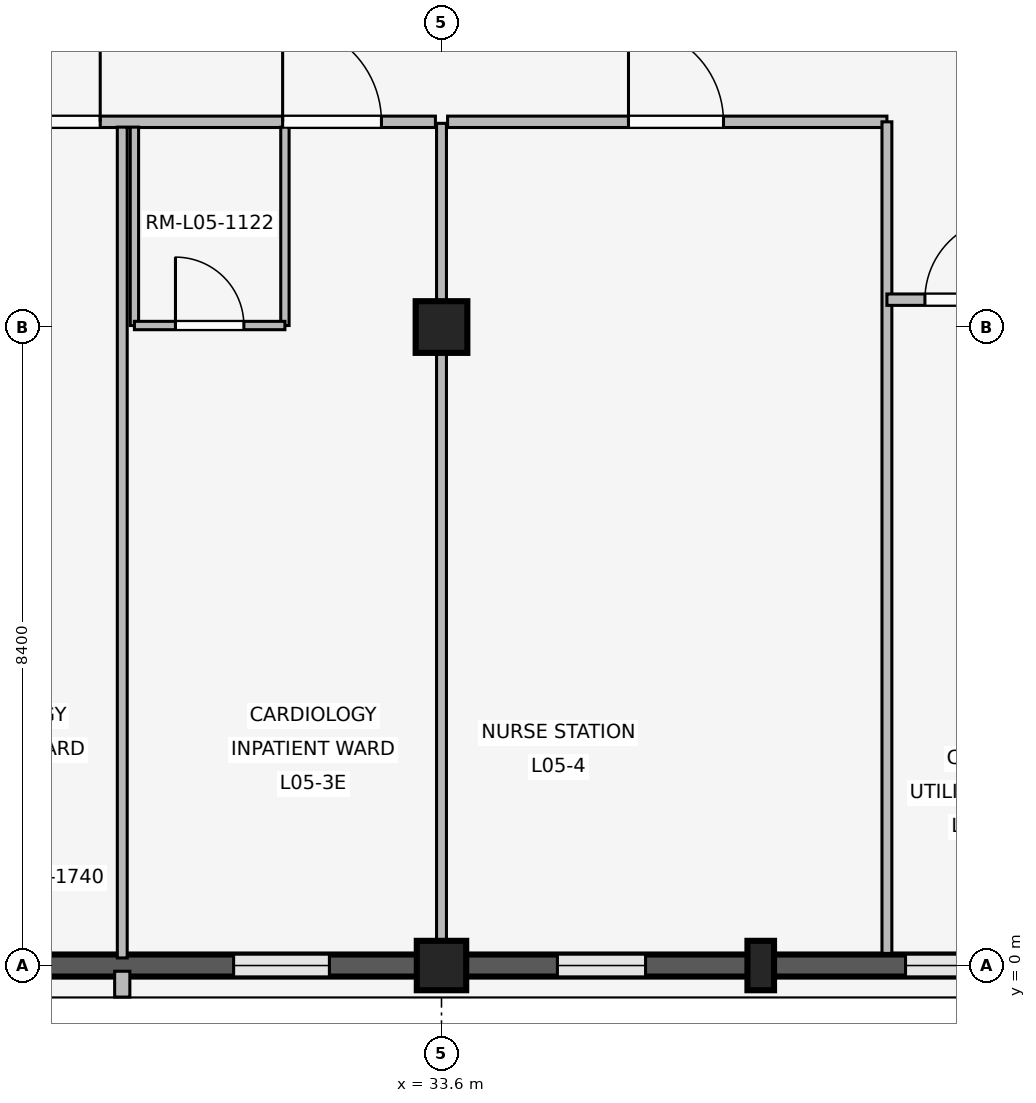
"""IFC4 building model, lengths in metres.
Left out: names, types, materials, properties, quantities, classifications, styles, units other than length and angle.
Written with IfcOpenShell. Run it as: python <this file> out.ifc"""

import sys

from ifc_helpers import new_model, si_unit, direction, frame, frame_2d, origin, origin_2d, place, context, subcontext, project, spatial, rectangle, extrude, element, fill, save


model = new_model("IFC4")
c1 = context("Model", 3, precision=1e-05, world=origin(), true_north=direction((0.0, 1.0)))
c2 = subcontext(c1, "Body", "Model", "MODEL_VIEW")
j1 = project(units=[si_unit("LENGTHUNIT", "METRE"), si_unit("PLANEANGLEUNIT", "RADIAN")], contexts=[c1])
p1 = place(None, origin())
s1 = spatial("IfcSite", under=j1, at=p1, CompositionType="ELEMENT")
p2 = place(p1, origin())
s2 = spatial("IfcBuilding", under=s1, at=p2, CompositionType="ELEMENT")
p3 = place(p2, frame((0.0, 0.0, 20.4)))
s3 = spatial("IfcBuildingStorey", under=s2, at=p3, CompositionType="ELEMENT", Elevation=20.4)
p4 = place(p3, frame((33.6, 0.0, 0.0), z_axis=(0.0, 0.0, 1.0), x_axis=(1.0, 0.0, 0.0)))
e1 = element("IfcColumn", 1, at=p4, inside=s3, PredefinedType="COLUMN", context=c2, shape_type="SweptSolid", body=[
    extrude(rectangle(XDim=0.65, YDim=0.65, at=origin_2d()), origin(), (0.0, 0.0, 1.0), 4.2),
])
p5 = place(p3, frame((33.6, 8.4, 0.0), z_axis=(0.0, 0.0, 1.0), x_axis=(1.0, 0.0, 0.0)))
e2 = element("IfcColumn", 2, at=p5, inside=s3, PredefinedType="COLUMN", context=c2, shape_type="SweptSolid", body=[
    extrude(rectangle(XDim=0.68, YDim=0.68, at=origin_2d()), origin(), (0.0, 0.0, 1.0), 4.2),
])
p6 = place(p3, frame((37.8, 0.0, 0.0), z_axis=(0.0, 0.0, 1.0), x_axis=(1.0, 0.0, 0.0)))
e3 = element("IfcColumn", 3, at=p6, inside=s3, PredefinedType="PILASTER", context=c2, shape_type="SweptSolid", body=[
    extrude(rectangle(XDim=0.35, YDim=0.65, at=origin_2d()), origin(), (0.0, 0.0, 1.0), 4.2),
])
p7 = place(p3, frame((33.28, 0.0, 0.0), z_axis=(0.0, 0.0, 1.0), x_axis=(-1.0, 0.0, 0.0)))
e4 = element("IfcWall", 4, at=p7, inside=s3, PredefinedType="SOLIDWALL", context=c2, shape_type="SweptSolid", body=[
    extrude(rectangle(XDim=7.76, YDim=0.29, at=frame_2d((3.88, 0.0))), origin(), (0.0, 0.0, 1.0), 3.34),
])
p8 = place(p7, frame((1.155, 0.0, 0.85)))
e5 = element("IfcOpeningElement", 5, at=p8, cuts=e4, PredefinedType="OPENING", context=c2, shape_type="SweptSolid", body=[
    extrude(rectangle(XDim=1.26, YDim=1.52, at=frame_2d((0.63, 0.76))), frame((0.0, 0.155, 0.0), z_axis=(0.0, -1.0, 0.0), x_axis=(1.0, 0.0, 0.0)), (0.0, 0.0, 1.0), 0.31),
])
p9 = place(p7, frame((5.345, 0.0, 0.85)))
e6 = element("IfcOpeningElement", 6, at=p9, cuts=e4, PredefinedType="OPENING", context=c2, shape_type="SweptSolid", body=[
    extrude(rectangle(XDim=1.26, YDim=1.52, at=frame_2d((0.63, 0.76))), frame((0.0, 0.155, 0.0), z_axis=(0.0, -1.0, 0.0), x_axis=(1.0, 0.0, 0.0)), (0.0, 0.0, 1.0), 0.31),
])
p10 = place(p3, frame((29.4, -0.075, 0.0), z_axis=(0.0, 0.0, 1.0), x_axis=(0.0, -1.0, 0.0)))
e7 = element("IfcWall", 7, at=p10, inside=s3, PredefinedType="ELEMENTEDWALL", context=c2, shape_type="SweptSolid", body=[
    extrude(rectangle(XDim=0.34, YDim=0.2, at=frame_2d((0.17, 0.0))), origin(), (0.0, 0.0, 1.0), 3.32),
])
p11 = place(p3, frame((41.68, 0.0, 0.0), z_axis=(0.0, 0.0, 1.0), x_axis=(-1.0, 0.0, 0.0)))
e8 = element("IfcWall", 8, at=p11, inside=s3, PredefinedType="SOLIDWALL", context=c2, shape_type="SweptSolid", body=[
    extrude(rectangle(XDim=7.76, YDim=0.29, at=frame_2d((3.88, 0.0))), origin(), (0.0, 0.0, 1.0), 3.34),
])
p12 = place(p11, frame((0.815, 0.0, 0.85)))
e9 = element("IfcOpeningElement", 9, at=p12, cuts=e8, PredefinedType="OPENING", context=c2, shape_type="SweptSolid", body=[
    extrude(rectangle(XDim=1.16, YDim=1.48, at=frame_2d((0.58, 0.74))), frame((0.0, 0.155, 0.0), z_axis=(0.0, -1.0, 0.0), x_axis=(1.0, 0.0, 0.0)), (0.0, 0.0, 1.0), 0.31),
])
p13 = place(p11, frame((5.395, 0.0, 0.85)))
e10 = element("IfcOpeningElement", 10, at=p13, cuts=e8, PredefinedType="OPENING", context=c2, shape_type="SweptSolid", body=[
    extrude(rectangle(XDim=1.16, YDim=1.48, at=frame_2d((0.58, 0.74))), frame((0.0, 0.155, 0.0), z_axis=(0.0, -1.0, 0.0), x_axis=(1.0, 0.0, 0.0)), (0.0, 0.0, 1.0), 0.31),
])
p14 = place(p3, frame((25.28, 11.1, 0.0), z_axis=(0.0, 0.0, 1.0), x_axis=(1.0, 0.0, 0.0)))
e11 = element("IfcWall", 11, at=p14, inside=s3, PredefinedType="PARTITIONING", context=c2, shape_type="SweptSolid", body=[
    extrude(rectangle(XDim=8.24, YDim=0.15, at=frame_2d((4.12, 0.0))), origin(), (0.0, 0.0, 1.0), 3.32),
])
p15 = place(p14, frame((2.53, 0.0, 0.0)))
e12 = element("IfcOpeningElement", 12, at=p15, cuts=e11, PredefinedType="OPENING", context=c2, shape_type="SweptSolid", body=[
    extrude(rectangle(XDim=1.3, YDim=2.25, at=frame_2d((0.65, 1.125))), frame((0.0, 0.085, 0.0), z_axis=(0.0, -1.0, 0.0), x_axis=(1.0, 0.0, 0.0)), (0.0, 0.0, 1.0), 0.17),
])
p16 = place(p14, frame((6.23, 0.0, 0.0)))
e13 = element("IfcOpeningElement", 13, at=p16, cuts=e11, PredefinedType="OPENING", context=c2, shape_type="SweptSolid", body=[
    extrude(rectangle(XDim=1.3, YDim=2.25, at=frame_2d((0.65, 1.125))), frame((0.0, 0.085, 0.0), z_axis=(0.0, -1.0, 0.0), x_axis=(1.0, 0.0, 0.0)), (0.0, 0.0, 1.0), 0.17),
])
p17 = place(p3, frame((29.4, 0.1, 0.0), z_axis=(0.0, 0.0, 1.0), x_axis=(0.0, 1.0, 0.0)))
e14 = element("IfcWall", 14, at=p17, inside=s3, PredefinedType="PARTITIONING", context=c2, shape_type="SweptSolid", body=[
    extrude(rectangle(XDim=10.93, YDim=0.13, at=frame_2d((5.465, 0.0))), origin(), (0.0, 0.0, 1.0), 3.32),
])
for number, where, z_axis, x_axis in (
    (15, (29.56, 8.42, 0.0), (0.0, 0.0, 1.0), (0.0, 1.0, 0.0)),
    (16, (31.54, 8.42, 0.0), (0.0, 0.0, 1.0), (0.0, 1.0, 0.0)),
):
    element("IfcWall", number, at=place(p3, frame(where, z_axis=z_axis, x_axis=x_axis)), inside=s3, PredefinedType="PARTITIONING", context=c2, shape_type="SweptSolid", body=[
        extrude(rectangle(XDim=2.61, YDim=0.11, at=frame_2d((1.305, 0.0))), origin(), (0.0, 0.0, 1.0), 3.32),
    ])
p18 = place(p3, frame((29.56, 8.42, 0.0), z_axis=(0.0, 0.0, 1.0), x_axis=(1.0, 0.0, 0.0)))
e17 = element("IfcWall", 17, at=p18, inside=s3, PredefinedType="PARTITIONING", context=c2, shape_type="SweptSolid", body=[
    extrude(rectangle(XDim=1.98, YDim=0.11, at=frame_2d((0.99, 0.0))), origin(), (0.0, 0.0, 1.0), 3.32),
])
p19 = place(p18, frame((0.54, 0.0, 0.0)))
e18 = element("IfcOpeningElement", 18, at=p19, cuts=e17, PredefinedType="OPENING", context=c2, shape_type="SweptSolid", body=[
    extrude(rectangle(XDim=0.9, YDim=2.1, at=frame_2d((0.45, 1.05))), frame((0.0, 0.065, 0.0), z_axis=(0.0, -1.0, 0.0), x_axis=(1.0, 0.0, 0.0)), (0.0, 0.0, 1.0), 0.13),
])
p20 = place(p3, frame((28.05, 1.15, 0.0), z_axis=(0.0, 0.0, 1.0), x_axis=(1.0, 0.0, 0.0)))
e19 = element("IfcWall", 19, at=p20, inside=s3, PredefinedType="PLUMBINGWALL", context=c2, shape_type="SweptSolid", body=[
    extrude(rectangle(XDim=0.9, YDim=0.24, at=frame_2d((0.45, 0.0))), origin(), (0.0, 0.0, 1.0), 3.32),
])
p21 = place(p3, frame((33.6, 0.14, 0.0), z_axis=(0.0, 0.0, 1.0), x_axis=(0.0, 1.0, 0.0)))
e20 = element("IfcWall", 20, at=p21, inside=s3, PredefinedType="PARTITIONING", context=c2, shape_type="SweptSolid", body=[
    extrude(rectangle(XDim=10.94, YDim=0.13, at=frame_2d((5.47, 0.0))), origin(), (0.0, 0.0, 1.0), 3.32),
])
p22 = place(p3, frame((33.68, 11.1, 0.0), z_axis=(0.0, 0.0, 1.0), x_axis=(1.0, 0.0, 0.0)))
e21 = element("IfcWall", 21, at=p22, inside=s3, PredefinedType="PARTITIONING", context=c2, shape_type="SweptSolid", body=[
    extrude(rectangle(XDim=5.78, YDim=0.15, at=frame_2d((2.89, 0.0))), origin(), (0.0, 0.0, 1.0), 3.32),
])
p23 = place(p22, frame((2.38, 0.0, 0.0)))
e22 = element("IfcOpeningElement", 22, at=p23, cuts=e21, PredefinedType="OPENING", context=c2, shape_type="SweptSolid", body=[
    extrude(rectangle(XDim=1.25, YDim=2.2, at=frame_2d((0.625, 1.1))), frame((0.0, 0.085, 0.0), z_axis=(0.0, -1.0, 0.0), x_axis=(1.0, 0.0, 0.0)), (0.0, 0.0, 1.0), 0.17),
])
p24 = place(p3, frame((39.46, 0.16, 0.0), z_axis=(0.0, 0.0, 1.0), x_axis=(0.0, 1.0, 0.0)))
e23 = element("IfcWall", 23, at=p24, inside=s3, PredefinedType="PARTITIONING", context=c2, shape_type="SweptSolid", body=[
    extrude(rectangle(XDim=10.94, YDim=0.13, at=frame_2d((5.47, 0.0))), origin(), (0.0, 0.0, 1.0), 3.32),
])
p25 = place(p3, frame((39.46, 8.76, 0.0), z_axis=(0.0, 0.0, 1.0), x_axis=(1.0, 0.0, 0.0)))
e24 = element("IfcWall", 24, at=p25, inside=s3, PredefinedType="PARTITIONING", context=c2, shape_type="SweptSolid", body=[
    extrude(rectangle(XDim=2.18, YDim=0.15, at=frame_2d((1.09, 0.0))), origin(), (0.0, 0.0, 1.0), 3.32),
])
p26 = place(p25, frame((0.5, 0.0, 0.0)))
e25 = element("IfcOpeningElement", 25, at=p26, cuts=e24, PredefinedType="OPENING", context=c2, shape_type="SweptSolid", body=[
    extrude(rectangle(XDim=1.08, YDim=2.15, at=frame_2d((0.54, 1.075))), frame((0.0, 0.085, 0.0), z_axis=(0.0, -1.0, 0.0), x_axis=(1.0, 0.0, 0.0)), (0.0, 0.0, 1.0), 0.17),
])
p27 = place(p8, origin())
e26 = element("IfcWindow", 26, at=p27, inside=s3, PartitioningType="SINGLE_PANEL", PredefinedType="WINDOW", context=c2, shape_type="SweptSolid", body=[
    extrude(rectangle(XDim=1.26, YDim=1.52, at=frame_2d((0.63, 0.76))), frame((0.0, 0.03, 0.0), z_axis=(0.0, -1.0, 0.0), x_axis=(1.0, 0.0, 0.0)), (0.0, 0.0, 1.0), 0.06),
])
fill(e5, e26)
p28 = place(p12, origin())
e27 = element("IfcWindow", 27, at=p28, inside=s3, PartitioningType="SINGLE_PANEL", PredefinedType="WINDOW", context=c2, shape_type="SweptSolid", body=[
    extrude(rectangle(XDim=1.16, YDim=1.48, at=frame_2d((0.58, 0.74))), frame((0.0, 0.03, 0.0), z_axis=(0.0, -1.0, 0.0), x_axis=(1.0, 0.0, 0.0)), (0.0, 0.0, 1.0), 0.06),
])
fill(e9, e27)
p29 = place(p13, origin())
e28 = element("IfcWindow", 28, at=p29, inside=s3, PartitioningType="SINGLE_PANEL", PredefinedType="WINDOW", context=c2, shape_type="SweptSolid", body=[
    extrude(rectangle(XDim=1.16, YDim=1.48, at=frame_2d((0.58, 0.74))), frame((0.0, 0.03, 0.0), z_axis=(0.0, -1.0, 0.0), x_axis=(1.0, 0.0, 0.0)), (0.0, 0.0, 1.0), 0.06),
])
fill(e10, e28)
p30 = place(p15, origin())
e29 = element("IfcDoor", 29, at=p30, inside=s3, OperationType="SINGLE_SWING_RIGHT", PredefinedType="DOOR", context=c2, shape_type="SweptSolid", body=[
    extrude(rectangle(XDim=1.3, YDim=2.25, at=frame_2d((0.65, 1.125))), frame((0.0, 0.025, 0.0), z_axis=(0.0, -1.0, 0.0), x_axis=(1.0, 0.0, 0.0)), (0.0, 0.0, 1.0), 0.05),
])
fill(e12, e29)
p31 = place(p16, origin())
e30 = element("IfcDoor", 30, at=p31, inside=s3, OperationType="SINGLE_SWING_LEFT", PredefinedType="DOOR", context=c2, shape_type="SweptSolid", body=[
    extrude(rectangle(XDim=1.3, YDim=2.25, at=frame_2d((0.65, 1.125))), frame((0.0, 0.025, 0.0), z_axis=(0.0, -1.0, 0.0), x_axis=(1.0, 0.0, 0.0)), (0.0, 0.0, 1.0), 0.05),
])
fill(e13, e30)
p32 = place(p19, origin())
e31 = element("IfcDoor", 31, at=p32, inside=s3, OperationType="SINGLE_SWING_LEFT", PredefinedType="DOOR", context=c2, shape_type="SweptSolid", body=[
    extrude(rectangle(XDim=0.9, YDim=2.1, at=frame_2d((0.45, 1.05))), frame((0.0, 0.025, 0.0), z_axis=(0.0, -1.0, 0.0), x_axis=(1.0, 0.0, 0.0)), (0.0, 0.0, 1.0), 0.05),
])
fill(e18, e31)
p33 = place(p23, origin())
e32 = element("IfcDoor", 32, at=p33, inside=s3, OperationType="SINGLE_SWING_LEFT", PredefinedType="DOOR", context=c2, shape_type="SweptSolid", body=[
    extrude(rectangle(XDim=1.25, YDim=2.2, at=frame_2d((0.625, 1.1))), frame((0.0, 0.025, 0.0), z_axis=(0.0, -1.0, 0.0), x_axis=(1.0, 0.0, 0.0)), (0.0, 0.0, 1.0), 0.05),
])
fill(e22, e32)
p34 = place(p26, origin())
e33 = element("IfcDoor", 33, at=p34, inside=s3, OperationType="SINGLE_SWING_RIGHT", PredefinedType="DOOR", context=c2, shape_type="SweptSolid", body=[
    extrude(rectangle(XDim=1.08, YDim=2.15, at=frame_2d((0.54, 1.075))), frame((0.0, 0.025, 0.0), z_axis=(0.0, -1.0, 0.0), x_axis=(1.0, 0.0, 0.0)), (0.0, 0.0, 1.0), 0.05),
])
fill(e25, e33)
save(model, sys.argv[1])
